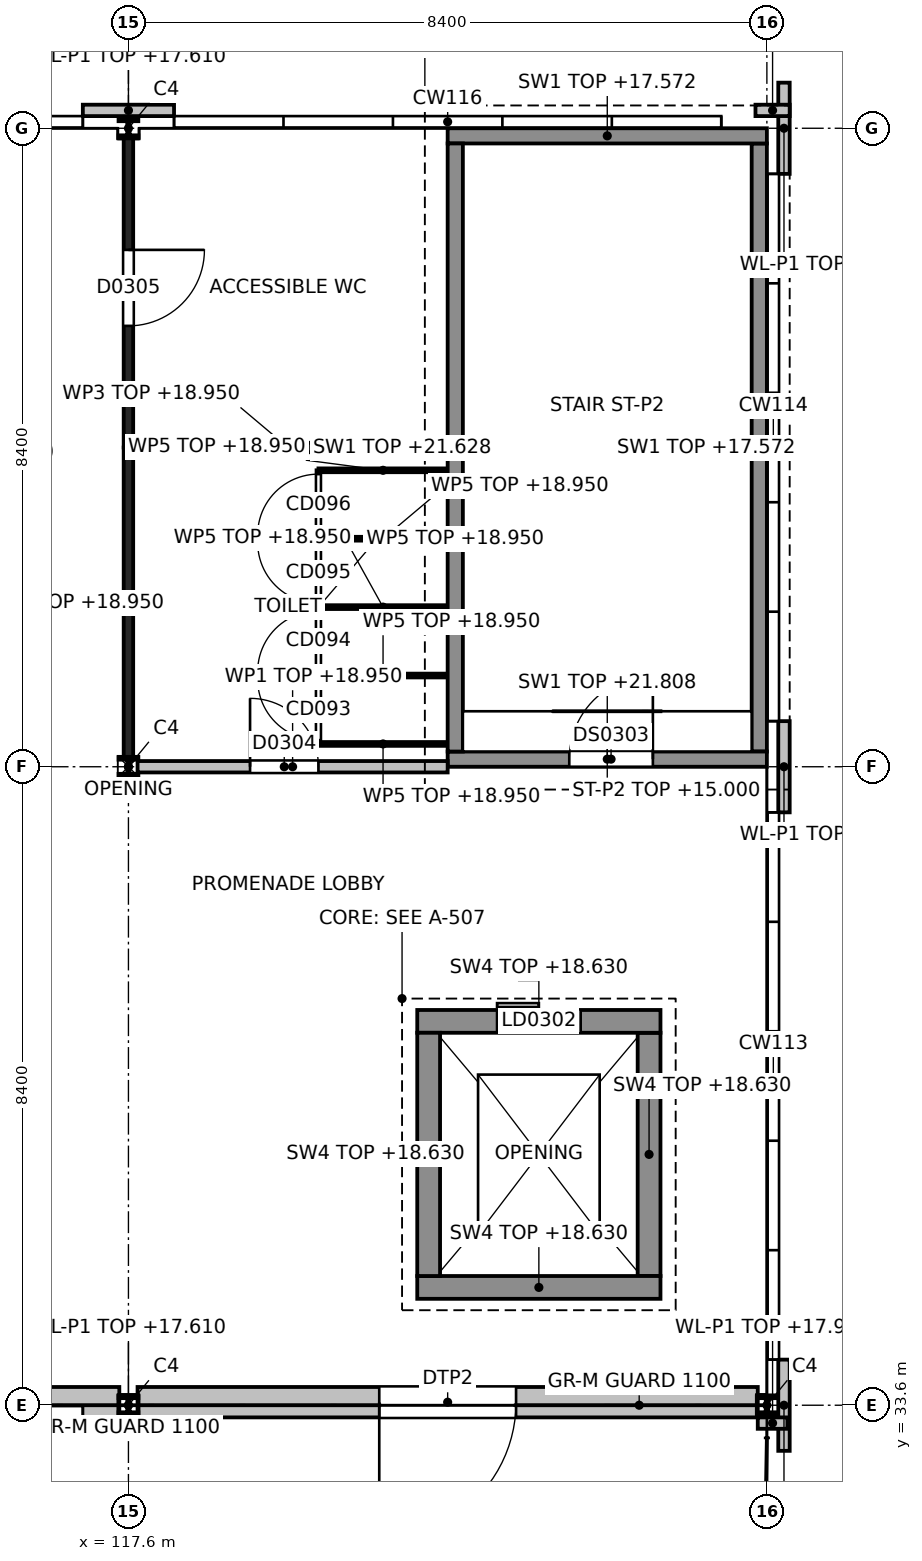
"""IFC4 building model, lengths in metres.
Left out: names, types, materials, properties, quantities, classifications, styles, units other than length and angle.
Written with IfcOpenShell. Run it as: python <this file> out.ifc"""

import sys

from ifc_helpers import new_model, si_unit, direction, frame, frame_2d, origin, origin_2d, place, context, subcontext, project, spatial, polyline, rectangle, i_section, outline, extrude, element, fill, save


model = new_model("IFC4")
c1 = context("Model", 3, precision=1e-05, world=origin(), true_north=direction((0.0, 1.0)))
c2 = subcontext(c1, "Body", "Model", "MODEL_VIEW")
j1 = project(units=[si_unit("LENGTHUNIT", "METRE"), si_unit("PLANEANGLEUNIT", "RADIAN")], contexts=[c1])
p1 = place(None, origin())
s1 = spatial("IfcSite", under=j1, at=p1, CompositionType="ELEMENT")
p2 = place(p1, origin())
s2 = spatial("IfcBuilding", under=s1, at=p2, CompositionType="ELEMENT")
p3 = place(p2, frame((0.0, 0.0, 15.0)))
s3 = spatial("IfcBuildingStorey", under=s2, at=p3, CompositionType="ELEMENT", Elevation=15.0)
p4 = place(p3, frame((117.6, 33.6, 0.0), z_axis=(0.0, 0.0, 1.0), x_axis=(1.0, 0.0, 0.0)))
e1 = element("IfcColumn", 1, at=p4, inside=s3, PredefinedType="COLUMN", context=c2, shape_type="SweptSolid", body=[
    extrude(i_section(OverallWidth=0.24, OverallDepth=0.24, WebThickness=0.01, FlangeThickness=0.017, at=origin_2d()), origin(), (0.0, 0.0, 1.0), 2.635),
])
p5 = place(p3, frame((117.6, 42.0, 0.0), z_axis=(0.0, 0.0, 1.0), x_axis=(1.0, 0.0, 0.0)))
e2 = element("IfcColumn", 2, at=p5, inside=s3, PredefinedType="COLUMN", context=c2, shape_type="SweptSolid", body=[
    extrude(i_section(OverallWidth=0.24, OverallDepth=0.24, WebThickness=0.01, FlangeThickness=0.017, at=origin_2d()), origin(), (0.0, 0.0, 1.0), 10.198),
])
for number, where, z_axis, x_axis in (
    (3, (117.6, 50.4, 0.0), (0.0, 0.0, 1.0), (1.0, 0.0, 0.0)),
    (4, (126.0, 33.6, 0.0), (0.0, 0.0, 1.0), (1.0, 0.0, 0.0)),
):
    element("IfcColumn", number, at=place(p3, frame(where, z_axis=z_axis, x_axis=x_axis)), inside=s3, PredefinedType="COLUMN", context=c2, shape_type="SweptSolid", body=[
        extrude(i_section(OverallWidth=0.24, OverallDepth=0.24, WebThickness=0.01, FlangeThickness=0.017, at=origin_2d()), origin(), (0.0, 0.0, 1.0), 2.635),
    ])
p6 = place(p3, frame((121.8, 42.1, 0.0), z_axis=(0.0, 0.0, 1.0), x_axis=(1.0, 0.0, 0.0)))
e5 = element("IfcWall", 5, at=p6, inside=s3, PredefinedType="SHEAR", context=c2, shape_type="SweptSolid", body=[
    extrude(outline(polyline([(0.0, 0.0), (4.2, 0.0), (4.2, 2.572), (3.953, 3.249), (0.0, 6.808), (0.0, 0.0)])), frame((0.0, 0.1, 0.0), z_axis=(0.0, -1.0, 0.0), x_axis=(1.0, 0.0, 0.0)), (0.0, 0.0, 1.0), 0.2),
])
p7 = place(p6, frame((1.6, 0.0, 0.0)))
e6 = element("IfcOpeningElement", 6, at=p7, cuts=e5, PredefinedType="OPENING", context=c2, shape_type="SweptSolid", body=[
    extrude(rectangle(XDim=1.1, YDim=2.1, at=frame_2d((0.55, 1.05))), frame((0.0, 0.1, 0.0), z_axis=(0.0, -1.0, 0.0), x_axis=(1.0, 0.0, 0.0)), (0.0, 0.0, 1.0), 0.2),
])
p8 = place(p3, frame((121.8, 50.3, 0.0), z_axis=(0.0, 0.0, 1.0), x_axis=(1.0, 0.0, 0.0)))
e7 = element("IfcWall", 7, at=p8, inside=s3, PredefinedType="SHEAR", context=c2, shape_type="SweptSolid", body=[
    extrude(outline(polyline([(0.0, 0.0), (4.2, 0.0), (4.2, 2.572), (0.0, 2.572), (0.0, 0.0)])), frame((0.0, 0.1, 0.0), z_axis=(0.0, -1.0, 0.0), x_axis=(1.0, 0.0, 0.0)), (0.0, 0.0, 1.0), 0.2),
])
p9 = place(p3, frame((121.9, 42.2, 0.0), z_axis=(0.0, 0.0, 1.0), x_axis=(0.0, 1.0, 0.0)))
e8 = element("IfcWall", 8, at=p9, inside=s3, PredefinedType="SHEAR", context=c2, shape_type="SweptSolid", body=[
    extrude(outline(polyline([(0.0, 0.0), (8.0, 0.0), (8.0, 3.207), (4.5, 6.358), (4.25, 6.151), (4.0, 6.263), (3.75, 6.628), (0.0, 6.628), (0.0, 0.0)])), frame((0.0, 0.1, 0.0), z_axis=(0.0, -1.0, 0.0), x_axis=(1.0, 0.0, 0.0)), (0.0, 0.0, 1.0), 0.2),
])
p10 = place(p3, frame((125.9, 42.2, 0.0), z_axis=(0.0, 0.0, 1.0), x_axis=(0.0, 1.0, 0.0)))
e9 = element("IfcWall", 9, at=p10, inside=s3, PredefinedType="SHEAR", context=c2, shape_type="SweptSolid", body=[
    extrude(outline(polyline([(0.0, 0.0), (8.0, 0.0), (8.0, 2.572), (0.0, 2.572), (0.0, 0.0)])), frame((0.0, 0.1, 0.0), z_axis=(0.0, -1.0, 0.0), x_axis=(1.0, 0.0, 0.0)), (0.0, 0.0, 1.0), 0.2),
])
p11 = place(p3, frame((121.4, 35.15, 0.0), z_axis=(0.0, 0.0, 1.0), x_axis=(1.0, 0.0, 0.0)))
e10 = element("IfcWall", 10, at=p11, inside=s3, PredefinedType="SHEAR", context=c2, shape_type="SweptSolid", body=[
    extrude(rectangle(XDim=3.2, YDim=0.3, at=frame_2d((1.6, 0.0))), origin(), (0.0, 0.0, 1.0), 3.63),
])
p12 = place(p3, frame((121.4, 38.65, 0.0), z_axis=(0.0, 0.0, 1.0), x_axis=(1.0, 0.0, 0.0)))
e11 = element("IfcWall", 11, at=p12, inside=s3, PredefinedType="SHEAR", context=c2, shape_type="SweptSolid", body=[
    extrude(rectangle(XDim=3.2, YDim=0.3, at=frame_2d((1.6, 0.0))), origin(), (0.0, 0.0, 1.0), 3.63),
])
p13 = place(p12, frame((1.05, 0.0, 0.0)))
e12 = element("IfcOpeningElement", 12, at=p13, cuts=e11, PredefinedType="OPENING", context=c2, shape_type="SweptSolid", body=[
    extrude(rectangle(XDim=1.1, YDim=2.1, at=frame_2d((0.55, 1.05))), frame((0.0, 0.15, 0.0), z_axis=(0.0, -1.0, 0.0), x_axis=(1.0, 0.0, 0.0)), (0.0, 0.0, 1.0), 0.3),
])
for number, where, z_axis, x_axis in (
    (13, (121.55, 35.3, 0.0), (0.0, 0.0, 1.0), (0.0, 1.0, 0.0)),
    (14, (124.45, 35.3, 0.0), (0.0, 0.0, 1.0), (0.0, 1.0, 0.0)),
):
    element("IfcWall", number, at=place(p3, frame(where, z_axis=z_axis, x_axis=x_axis)), inside=s3, PredefinedType="SHEAR", context=c2, shape_type="SweptSolid", body=[
        extrude(rectangle(XDim=3.2, YDim=0.3, at=frame_2d((1.6, 0.0))), origin(), (0.0, 0.0, 1.0), 3.63),
    ])
p14 = place(p3, frame((117.0, 50.635, 0.0), z_axis=(0.0, 0.0, 1.0), x_axis=(1.0, 0.0, 0.0)))
e15 = element("IfcWall", 15, at=p14, inside=s3, PredefinedType="SOLIDWALL", context=c2, shape_type="SweptSolid", body=[
    extrude(rectangle(XDim=1.2, YDim=0.15, at=frame_2d((0.6, 0.0))), origin(), (0.0, 0.0, 1.0), 2.61),
])
p15 = place(p3, frame((125.85, 50.635, 0.0), z_axis=(0.0, 0.0, 1.0), x_axis=(1.0, 0.0, 0.0)))
e16 = element("IfcWall", 16, at=p15, inside=s3, PredefinedType="SOLIDWALL", context=c2, shape_type="SweptSolid", body=[
    extrude(rectangle(XDim=0.45, YDim=0.15, at=frame_2d((0.225, 0.0))), origin(), (0.0, 0.0, 1.0), 2.9),
])
p16 = place(p3, frame((126.225, 33.0, 0.0), z_axis=(0.0, 0.0, 1.0), x_axis=(0.0, 1.0, 0.0)))
e17 = element("IfcWall", 17, at=p16, inside=s3, PredefinedType="SOLIDWALL", context=c2, shape_type="SweptSolid", body=[
    extrude(rectangle(XDim=1.2, YDim=0.15, at=frame_2d((0.6, 0.0))), origin(), (0.0, 0.0, 1.0), 2.61),
])
p17 = place(p3, frame((126.225, 41.4, 0.0), z_axis=(0.0, 0.0, 1.0), x_axis=(0.0, 1.0, 0.0)))
e18 = element("IfcWall", 18, at=p17, inside=s3, PredefinedType="SOLIDWALL", context=c2, shape_type="SweptSolid", body=[
    extrude(rectangle(XDim=1.2, YDim=0.15, at=frame_2d((0.6, 0.0))), origin(), (0.0, 0.0, 1.0), 2.61),
])
p18 = place(p3, frame((126.225, 49.8, 0.0), z_axis=(0.0, 0.0, 1.0), x_axis=(0.0, 1.0, 0.0)))
e19 = element("IfcWall", 19, at=p18, inside=s3, PredefinedType="SOLIDWALL", context=c2, shape_type="SweptSolid", body=[
    extrude(rectangle(XDim=1.2, YDim=0.15, at=frame_2d((0.6, 0.0))), origin(), (0.0, 0.0, 1.0), 2.61),
])
p19 = place(p3, frame((109.32, 33.64, 0.0), z_axis=(0.0, 0.0, 1.0), x_axis=(1.0, 0.0, 0.0)))
e20 = element("IfcWall", 20, at=p19, inside=s3, PredefinedType="SOLIDWALL", context=c2, shape_type="SweptSolid", body=[
    extrude(rectangle(XDim=8.16, YDim=0.4, at=frame_2d((4.08, 0.0))), origin(), (0.0, 0.0, 1.0), 2.15),
])
p20 = place(p19, frame((3.18, 0.0, 0.0)))
e21 = element("IfcOpeningElement", 21, at=p20, cuts=e20, PredefinedType="OPENING", context=c2, shape_type="SweptSolid", body=[
    extrude(rectangle(XDim=1.8, YDim=2.4, at=frame_2d((0.9, 1.2))), frame((0.0, 0.2, 0.0), z_axis=(0.0, -1.0, 0.0), x_axis=(1.0, 0.0, 0.0)), (0.0, 0.0, 1.0), 0.4),
])
p21 = place(p3, frame((117.72, 33.64, 0.0), z_axis=(0.0, 0.0, 1.0), x_axis=(1.0, 0.0, 0.0)))
e22 = element("IfcWall", 22, at=p21, inside=s3, PredefinedType="SOLIDWALL", context=c2, shape_type="SweptSolid", body=[
    extrude(rectangle(XDim=8.16, YDim=0.4, at=frame_2d((4.08, 0.0))), origin(), (0.0, 0.0, 1.0), 2.15),
])
p22 = place(p21, frame((3.18, 0.0, 0.0)))
e23 = element("IfcOpeningElement", 23, at=p22, cuts=e22, PredefinedType="OPENING", context=c2, shape_type="SweptSolid", body=[
    extrude(rectangle(XDim=1.8, YDim=2.4, at=frame_2d((0.9, 1.2))), frame((0.0, 0.2, 0.0), z_axis=(0.0, -1.0, 0.0), x_axis=(1.0, 0.0, 0.0)), (0.0, 0.0, 1.0), 0.4),
])
p23 = place(p3, frame((117.0, 33.365, 0.0), z_axis=(0.0, 0.0, 1.0), x_axis=(1.0, 0.0, 0.0)))
e24 = element("IfcWall", 24, at=p23, inside=s3, PredefinedType="SOLIDWALL", context=c2, shape_type="SweptSolid", body=[
    extrude(rectangle(XDim=1.2, YDim=0.15, at=frame_2d((0.6, 0.0))), origin(), (0.0, 0.0, 1.0), 2.61),
])
p24 = place(p3, frame((125.88, 33.365, 0.0), z_axis=(0.0, 0.0, 1.0), x_axis=(1.0, 0.0, 0.0)))
e25 = element("IfcWall", 25, at=p24, inside=s3, PredefinedType="SOLIDWALL", context=c2, shape_type="SweptSolid", body=[
    extrude(rectangle(XDim=0.39, YDim=0.15, at=frame_2d((0.195, 0.0))), origin(), (0.0, 0.0, 1.0), 2.9),
])
p25 = place(p3, frame((117.6, 42.12, 0.0), z_axis=(0.0, 0.0, 1.0), x_axis=(0.0, 1.0, 0.0)))
e26 = element("IfcWall", 26, at=p25, inside=s3, PredefinedType="PARTITIONING", context=c2, shape_type="SweptSolid", body=[
    extrude(rectangle(XDim=4.08, YDim=0.125, at=frame_2d((2.04, 0.0))), origin(), (0.0, 0.0, 1.0), 3.95),
])
p26 = place(p3, frame((117.6, 46.2, 0.0), z_axis=(0.0, 0.0, 1.0), x_axis=(0.0, 1.0, 0.0)))
e27 = element("IfcWall", 27, at=p26, inside=s3, PredefinedType="PARTITIONING", context=c2, shape_type="SweptSolid", body=[
    extrude(rectangle(XDim=4.08, YDim=0.125, at=frame_2d((2.04, 0.0))), origin(), (0.0, 0.0, 1.0), 3.95),
])
p27 = place(p26, frame((1.6, 0.0, 0.0)))
e28 = element("IfcOpeningElement", 28, at=p27, cuts=e27, PredefinedType="OPENING", context=c2, shape_type="SweptSolid", body=[
    extrude(rectangle(XDim=1.0, YDim=2.1, at=frame_2d((0.5, 1.05))), frame((0.0, 0.062, 0.0), z_axis=(0.0, -1.0, 0.0), x_axis=(1.0, 0.0, 0.0)), (0.0, 0.0, 1.0), 0.125),
])
p28 = place(p3, frame((117.72, 42.0, 0.0), z_axis=(0.0, 0.0, 1.0), x_axis=(1.0, 0.0, 0.0)))
e29 = element("IfcWall", 29, at=p28, inside=s3, PredefinedType="PARTITIONING", context=c2, shape_type="SweptSolid", body=[
    extrude(rectangle(XDim=4.08, YDim=0.15, at=frame_2d((2.04, 0.0))), origin(), (0.0, 0.0, 1.0), 3.95),
])
p29 = place(p28, frame((1.48, 0.0, 0.0)))
e30 = element("IfcOpeningElement", 30, at=p29, cuts=e29, PredefinedType="OPENING", context=c2, shape_type="SweptSolid", body=[
    extrude(rectangle(XDim=0.9, YDim=2.1, at=frame_2d((0.45, 1.05))), frame((0.0, 0.075, 0.0), z_axis=(0.0, -1.0, 0.0), x_axis=(1.0, 0.0, 0.0)), (0.0, 0.0, 1.0), 0.15),
])
p30 = place(p3, frame((117.6, 46.2, 0.0), z_axis=(0.0, 0.0, 1.0), x_axis=(1.0, 0.0, 0.0)))
e31 = element("IfcWall", 31, at=p30, inside=s3, PredefinedType="PARTITIONING", context=c2, shape_type="SweptSolid", body=[
    extrude(rectangle(XDim=4.2, YDim=0.125, at=frame_2d((2.1, 0.0))), origin(), (0.0, 0.0, 1.0), 3.95),
])
p31 = place(p3, frame((120.1, 42.3, 0.0), z_axis=(0.0, 0.0, 1.0), x_axis=(0.0, 1.0, 0.0)))
e32 = element("IfcWall", 32, at=p31, inside=s3, PredefinedType="PARTITIONING", context=c2, shape_type="SweptSolid", body=[
    extrude(rectangle(XDim=3.6, YDim=0.05, at=frame_2d((1.8, 0.0))), origin(), (0.0, 0.0, 1.0), 3.95),
])
p32 = place(p31, frame((0.05, 0.0, 0.0)))
e33 = element("IfcOpeningElement", 33, at=p32, cuts=e32, PredefinedType="OPENING", context=c2, shape_type="SweptSolid", body=[
    extrude(rectangle(XDim=0.8, YDim=2.0, at=frame_2d((0.4, 1.0))), frame((0.0, 0.025, 0.0), z_axis=(0.0, -1.0, 0.0), x_axis=(1.0, 0.0, 0.0)), (0.0, 0.0, 1.0), 0.05),
])
p33 = place(p31, frame((0.95, 0.0, 0.0)))
e34 = element("IfcOpeningElement", 34, at=p33, cuts=e32, PredefinedType="OPENING", context=c2, shape_type="SweptSolid", body=[
    extrude(rectangle(XDim=0.8, YDim=2.0, at=frame_2d((0.4, 1.0))), frame((0.0, 0.025, 0.0), z_axis=(0.0, -1.0, 0.0), x_axis=(1.0, 0.0, 0.0)), (0.0, 0.0, 1.0), 0.05),
])
p34 = place(p31, frame((1.85, 0.0, 0.0)))
e35 = element("IfcOpeningElement", 35, at=p34, cuts=e32, PredefinedType="OPENING", context=c2, shape_type="SweptSolid", body=[
    extrude(rectangle(XDim=0.8, YDim=2.0, at=frame_2d((0.4, 1.0))), frame((0.0, 0.025, 0.0), z_axis=(0.0, -1.0, 0.0), x_axis=(1.0, 0.0, 0.0)), (0.0, 0.0, 1.0), 0.05),
])
p35 = place(p31, frame((2.75, 0.0, 0.0)))
e36 = element("IfcOpeningElement", 36, at=p35, cuts=e32, PredefinedType="OPENING", context=c2, shape_type="SweptSolid", body=[
    extrude(rectangle(XDim=0.8, YDim=2.0, at=frame_2d((0.4, 1.0))), frame((0.0, 0.025, 0.0), z_axis=(0.0, -1.0, 0.0), x_axis=(1.0, 0.0, 0.0)), (0.0, 0.0, 1.0), 0.05),
])
for number, where, z_axis, x_axis in (
    (37, (121.8, 42.3, 0.0), (0.0, 0.0, 1.0), (-1.0, 0.0, 0.0)),
    (38, (121.8, 43.2, 0.0), (0.0, 0.0, 1.0), (-1.0, 0.0, 0.0)),
    (39, (121.8, 44.1, 0.0), (0.0, 0.0, 1.0), (-1.0, 0.0, 0.0)),
    (40, (121.8, 45.0, 0.0), (0.0, 0.0, 1.0), (-1.0, 0.0, 0.0)),
    (41, (121.8, 45.9, 0.0), (0.0, 0.0, 1.0), (-1.0, 0.0, 0.0)),
):
    element("IfcWall", number, at=place(p3, frame(where, z_axis=z_axis, x_axis=x_axis)), inside=s3, PredefinedType="PARTITIONING", context=c2, shape_type="SweptSolid", body=[
        extrude(rectangle(XDim=1.7, YDim=0.05, at=frame_2d((0.85, 0.0))), origin(), (0.0, 0.0, 1.0), 3.95),
    ])
p36 = place(p22, origin())
e42 = element("IfcDoor", 42, at=p36, inside=s3, OperationType="DOUBLE_DOOR_SINGLE_SWING", PredefinedType="DOOR", context=c2, shape_type="SweptSolid", body=[
    extrude(rectangle(XDim=1.8, YDim=2.4, at=frame_2d((0.9, 1.2))), frame((0.0, 0.025, 0.0), z_axis=(0.0, -1.0, 0.0), x_axis=(1.0, 0.0, 0.0)), (0.0, 0.0, 1.0), 0.05),
])
fill(e23, e42)
p37 = place(p29, origin())
e43 = element("IfcDoor", 43, at=p37, inside=s3, OperationType="SINGLE_SWING_LEFT", PredefinedType="DOOR", context=c2, shape_type="SweptSolid", body=[
    extrude(rectangle(XDim=0.9, YDim=2.1, at=frame_2d((0.45, 1.05))), frame((0.0, 0.025, 0.0), z_axis=(0.0, -1.0, 0.0), x_axis=(1.0, 0.0, 0.0)), (0.0, 0.0, 1.0), 0.05),
])
fill(e30, e43)
p38 = place(p27, origin())
e44 = element("IfcDoor", 44, at=p38, inside=s3, OperationType="SINGLE_SWING_RIGHT", PredefinedType="DOOR", context=c2, shape_type="SweptSolid", body=[
    extrude(rectangle(XDim=1.0, YDim=2.1, at=frame_2d((0.5, 1.05))), frame((0.0, 0.025, 0.0), z_axis=(0.0, -1.0, 0.0), x_axis=(1.0, 0.0, 0.0)), (0.0, 0.0, 1.0), 0.05),
])
fill(e28, e44)
p39 = place(p7, origin())
e45 = element("IfcDoor", 45, at=p39, inside=s3, OperationType="SINGLE_SWING_RIGHT", PredefinedType="DOOR", context=c2, shape_type="SweptSolid", body=[
    extrude(rectangle(XDim=1.1, YDim=2.1, at=frame_2d((0.55, 1.05))), frame((0.0, 0.025, 0.0), z_axis=(0.0, -1.0, 0.0), x_axis=(1.0, 0.0, 0.0)), (0.0, 0.0, 1.0), 0.05),
])
fill(e6, e45)
p40 = place(p13, origin())
e46 = element("IfcDoor", 46, at=p40, inside=s3, OperationType="SLIDING_TO_RIGHT", PredefinedType="DOOR", context=c2, shape_type="SweptSolid", body=[
    extrude(rectangle(XDim=1.1, YDim=2.1, at=frame_2d((0.55, 1.05))), frame((0.0, 0.025, 0.0), z_axis=(0.0, -1.0, 0.0), x_axis=(1.0, 0.0, 0.0)), (0.0, 0.0, 1.0), 0.05),
])
fill(e12, e46)
p41 = place(p32, origin())
e47 = element("IfcDoor", 47, at=p41, inside=s3, OperationType="SINGLE_SWING_RIGHT", PredefinedType="DOOR", context=c2, shape_type="SweptSolid", body=[
    extrude(rectangle(XDim=0.8, YDim=2.0, at=frame_2d((0.4, 1.0))), frame((0.0, 0.025, 0.0), z_axis=(0.0, -1.0, 0.0), x_axis=(1.0, 0.0, 0.0)), (0.0, 0.0, 1.0), 0.05),
])
fill(e33, e47)
p42 = place(p33, origin())
e48 = element("IfcDoor", 48, at=p42, inside=s3, OperationType="SINGLE_SWING_LEFT", PredefinedType="DOOR", context=c2, shape_type="SweptSolid", body=[
    extrude(rectangle(XDim=0.8, YDim=2.0, at=frame_2d((0.4, 1.0))), frame((0.0, 0.025, 0.0), z_axis=(0.0, -1.0, 0.0), x_axis=(1.0, 0.0, 0.0)), (0.0, 0.0, 1.0), 0.05),
])
fill(e34, e48)
p43 = place(p34, origin())
e49 = element("IfcDoor", 49, at=p43, inside=s3, OperationType="SINGLE_SWING_RIGHT", PredefinedType="DOOR", context=c2, shape_type="SweptSolid", body=[
    extrude(rectangle(XDim=0.8, YDim=2.0, at=frame_2d((0.4, 1.0))), frame((0.0, 0.025, 0.0), z_axis=(0.0, -1.0, 0.0), x_axis=(1.0, 0.0, 0.0)), (0.0, 0.0, 1.0), 0.05),
])
fill(e35, e49)
p44 = place(p35, origin())
e50 = element("IfcDoor", 50, at=p44, inside=s3, OperationType="SINGLE_SWING_LEFT", PredefinedType="DOOR", context=c2, shape_type="SweptSolid", body=[
    extrude(rectangle(XDim=0.8, YDim=2.0, at=frame_2d((0.4, 1.0))), frame((0.0, 0.025, 0.0), z_axis=(0.0, -1.0, 0.0), x_axis=(1.0, 0.0, 0.0)), (0.0, 0.0, 1.0), 0.05),
])
fill(e36, e50)
save(model, sys.argv[1])
